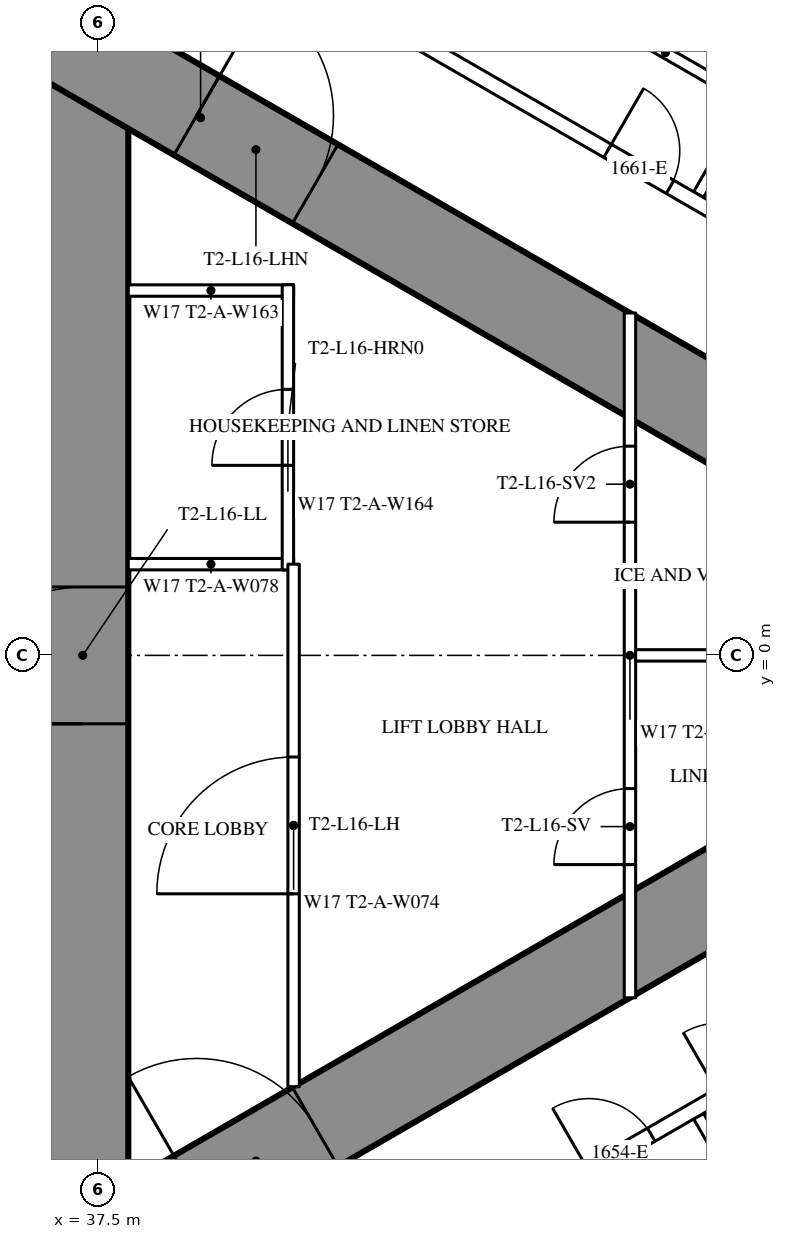
"""IFC4 building model, lengths in metres.
Left out: names, types, materials, properties, quantities, classifications, styles, units other than length and angle.
Written with IfcOpenShell. Run it as: python <this file> out.ifc"""

import sys

from ifc_helpers import new_model, si_unit, direction, frame, frame_2d, origin, place, context, subcontext, project, spatial, rectangle, extrude, element, fill, save


model = new_model("IFC4")
c1 = context("Model", 3, precision=1e-05, world=origin(), true_north=direction((0.0, 1.0)))
c2 = subcontext(c1, "Body", "Model", "MODEL_VIEW")
j1 = project(units=[si_unit("LENGTHUNIT", "METRE"), si_unit("PLANEANGLEUNIT", "RADIAN")], contexts=[c1])
p1 = place(None, origin())
s1 = spatial("IfcSite", under=j1, at=p1, CompositionType="ELEMENT")
p2 = place(p1, origin())
s2 = spatial("IfcBuilding", under=s1, at=p2, CompositionType="ELEMENT")
p3 = place(p2, frame((0.0, 0.0, 63.5)))
s3 = spatial("IfcBuildingStorey", under=s2, at=p3, CompositionType="ELEMENT", Elevation=63.5)
p4 = place(p3, frame((37.3, -8.6, 0.0), z_axis=(0.0, 0.0, 1.0), x_axis=(0.0, 1.0, 0.0)))
e1 = element("IfcWall", 1, at=p4, inside=s3, PredefinedType="SHEAR", context=c2, shape_type="SweptSolid", body=[
    extrude(rectangle(XDim=17.2, YDim=1.2, at=frame_2d((8.6, 0.0))), origin(), (0.0, 0.0, 1.0), 3.5),
])
p5 = place(p4, frame((7.7, 0.0, 0.0)))
e2 = element("IfcOpeningElement", 2, at=p5, cuts=e1, PredefinedType="OPENING", context=c2, shape_type="SweptSolid", body=[
    extrude(rectangle(XDim=1.8, YDim=2.2, at=frame_2d((0.9, 1.1))), frame((0.0, 0.61, 0.0), z_axis=(0.0, -1.0, 0.0), x_axis=(1.0, 0.0, 0.0)), (0.0, 0.0, 1.0), 1.22),
])
p6 = place(p3, frame((27.2, -13.8, 0.0), z_axis=(0.0, 0.0, 1.0), x_axis=(0.866027159892, 0.499996958321, 0.0)))
e3 = element("IfcWall", 3, at=p6, inside=s3, PredefinedType="SHEAR", context=c2, shape_type="SweptSolid", body=[
    extrude(rectangle(XDim=27.947, YDim=1.2, at=frame_2d((13.973, 0.0))), origin(), (0.0, 0.0, 1.0), 3.5),
])
p7 = place(p6, frame((4.6, 0.0, 0.0)))
e4 = element("IfcOpeningElement", 4, at=p7, cuts=e3, PredefinedType="OPENING", context=c2, shape_type="SweptSolid", body=[
    extrude(rectangle(XDim=1.0, YDim=2.2, at=frame_2d((0.5, 1.1))), frame((0.0, 0.61, 0.0), z_axis=(0.0, -1.0, 0.0), x_axis=(1.0, 0.0, 0.0)), (0.0, 0.0, 1.0), 1.22),
])
p8 = place(p6, frame((13.395, 0.0, 0.0)))
e5 = element("IfcOpeningElement", 5, at=p8, cuts=e3, PredefinedType="OPENING", context=c2, shape_type="SweptSolid", body=[
    extrude(rectangle(XDim=1.8, YDim=2.2, at=frame_2d((0.9, 1.1))), frame((0.0, 0.61, 0.0), z_axis=(0.0, -1.0, 0.0), x_axis=(1.0, 0.0, 0.0)), (0.0, 0.0, 1.0), 1.22),
])
p9 = place(p3, frame((27.2, 13.8, 0.0), z_axis=(0.0, 0.0, 1.0), x_axis=(0.866024515034, -0.500001539357, 0.0)))
e6 = element("IfcWall", 6, at=p9, inside=s3, PredefinedType="SHEAR", context=c2, shape_type="SweptSolid", body=[
    extrude(rectangle(XDim=26.907, YDim=1.2, at=frame_2d((13.454, 0.0))), origin(), (0.0, 0.0, 1.0), 3.5),
])
p10 = place(p9, frame((4.6, 0.0, 0.0)))
e7 = element("IfcOpeningElement", 7, at=p10, cuts=e6, PredefinedType="OPENING", context=c2, shape_type="SweptSolid", body=[
    extrude(rectangle(XDim=1.0, YDim=2.2, at=frame_2d((0.5, 1.1))), frame((0.0, 0.61, 0.0), z_axis=(0.0, -1.0, 0.0), x_axis=(1.0, 0.0, 0.0)), (0.0, 0.0, 1.0), 1.22),
])
p11 = place(p9, frame((13.395, 0.0, 0.0)))
e8 = element("IfcOpeningElement", 8, at=p11, cuts=e6, PredefinedType="OPENING", context=c2, shape_type="SweptSolid", body=[
    extrude(rectangle(XDim=1.8, YDim=2.2, at=frame_2d((0.9, 1.1))), frame((0.0, 0.61, 0.0), z_axis=(0.0, -1.0, 0.0), x_axis=(1.0, 0.0, 0.0)), (0.0, 0.0, 1.0), 1.22),
])
p12 = place(p3, frame((45.403, -6.062, 0.0), z_axis=(0.0, 0.0, 1.0), x_axis=(0.500007077968, -0.866021317279, 0.0)))
e9 = element("IfcWall", 9, at=p12, inside=s3, PredefinedType="PARTITIONING", context=c2, shape_type="SweptSolid", body=[
    extrude(rectangle(XDim=12.721, YDim=0.15, at=frame_2d((6.361, 0.0))), origin(), (0.0, 0.0, 1.0), 3.25),
])
p13 = place(p3, frame((45.403, 6.062, 0.0), z_axis=(0.0, 0.0, 1.0), x_axis=(0.500013434677, 0.866017647131, 0.0)))
e10 = element("IfcWall", 10, at=p13, inside=s3, PredefinedType="PARTITIONING", context=c2, shape_type="SweptSolid", body=[
    extrude(rectangle(XDim=9.902, YDim=0.15, at=frame_2d((4.951, 0.0))), origin(), (0.0, 0.0, 1.0), 2.25),
])
p14 = place(p3, frame((37.96, -10.243, 0.0), z_axis=(0.0, 0.0, 1.0), x_axis=(0.866026429433, 0.499998223521, 0.0)))
e11 = element("IfcWall", 11, at=p14, inside=s3, PredefinedType="PARTITIONING", context=c2, shape_type="SweptSolid", body=[
    extrude(rectangle(XDim=20.487, YDim=0.2, at=frame_2d((10.243, 0.0))), origin(), (0.0, 0.0, 1.0), 3.25),
])
p15 = place(p14, frame((6.925, 0.0, 0.0)))
e12 = element("IfcOpeningElement", 12, at=p15, cuts=e11, PredefinedType="OPENING", context=c2, shape_type="SweptSolid", body=[
    extrude(rectangle(XDim=0.95, YDim=2.2, at=frame_2d((0.475, 1.1))), frame((0.0, 0.11, 0.0), z_axis=(0.0, -1.0, 0.0), x_axis=(1.0, 0.0, 0.0)), (0.0, 0.0, 1.0), 0.22),
])
p16 = place(p14, frame((8.912, 0.0, 0.0)))
e13 = element("IfcOpeningElement", 13, at=p16, cuts=e11, PredefinedType="OPENING", context=c2, shape_type="SweptSolid", body=[
    extrude(rectangle(XDim=0.95, YDim=2.2, at=frame_2d((0.475, 1.1))), frame((0.0, 0.11, 0.0), z_axis=(0.0, -1.0, 0.0), x_axis=(1.0, 0.0, 0.0)), (0.0, 0.0, 1.0), 0.22),
])
p17 = place(p14, frame((13.535, 0.0, 0.0)))
e14 = element("IfcOpeningElement", 14, at=p17, cuts=e11, PredefinedType="OPENING", context=c2, shape_type="SweptSolid", body=[
    extrude(rectangle(XDim=0.95, YDim=2.2, at=frame_2d((0.475, 1.1))), frame((0.0, 0.11, 0.0), z_axis=(0.0, -1.0, 0.0), x_axis=(1.0, 0.0, 0.0)), (0.0, 0.0, 1.0), 0.22),
])
p18 = place(p14, frame((17.585, 0.0, 0.0)))
e15 = element("IfcOpeningElement", 15, at=p18, cuts=e11, PredefinedType="OPENING", context=c2, shape_type="SweptSolid", body=[
    extrude(rectangle(XDim=0.95, YDim=2.2, at=frame_2d((0.475, 1.1))), frame((0.0, 0.11, 0.0), z_axis=(0.0, -1.0, 0.0), x_axis=(1.0, 0.0, 0.0)), (0.0, 0.0, 1.0), 0.22),
])
p19 = place(p14, frame((2.875, 0.0, 0.0)))
e16 = element("IfcOpeningElement", 16, at=p19, cuts=e11, PredefinedType="OPENING", context=c2, shape_type="SweptSolid", body=[
    extrude(rectangle(XDim=0.95, YDim=2.2, at=frame_2d((0.475, 1.1))), frame((0.0, 0.11, 0.0), z_axis=(0.0, -1.0, 0.0), x_axis=(1.0, 0.0, 0.0)), (0.0, 0.0, 1.0), 0.22),
])
p20 = place(p3, frame((41.619, 8.131, 0.0), z_axis=(0.0, 0.0, 1.0), x_axis=(0.86603245327, -0.499987789734, 0.0)))
e17 = element("IfcWall", 17, at=p20, inside=s3, PredefinedType="PARTITIONING", context=c2, shape_type="SweptSolid", body=[
    extrude(rectangle(XDim=16.142, YDim=0.2, at=frame_2d((8.071, 0.0))), origin(), (0.0, 0.0, 1.0), 3.25),
])
p21 = place(p20, frame((13.36, 0.0, 0.0)))
e18 = element("IfcOpeningElement", 18, at=p21, cuts=e17, PredefinedType="OPENING", context=c2, shape_type="SweptSolid", body=[
    extrude(rectangle(XDim=0.95, YDim=2.2, at=frame_2d((0.475, 1.1))), frame((0.0, 0.11, 0.0), z_axis=(0.0, -1.0, 0.0), x_axis=(1.0, 0.0, 0.0)), (0.0, 0.0, 1.0), 0.22),
])
p22 = place(p20, frame((4.687, 0.0, 0.0)))
e19 = element("IfcOpeningElement", 19, at=p22, cuts=e17, PredefinedType="OPENING", context=c2, shape_type="SweptSolid", body=[
    extrude(rectangle(XDim=0.95, YDim=2.2, at=frame_2d((0.475, 1.1))), frame((0.0, 0.11, 0.0), z_axis=(0.0, -1.0, 0.0), x_axis=(1.0, 0.0, 0.0)), (0.0, 0.0, 1.0), 0.22),
])
p23 = place(p20, frame((2.987, 0.0, 0.0)))
e20 = element("IfcOpeningElement", 20, at=p23, cuts=e17, PredefinedType="OPENING", context=c2, shape_type="SweptSolid", body=[
    extrude(rectangle(XDim=0.95, YDim=2.2, at=frame_2d((0.475, 1.1))), frame((0.0, 0.11, 0.0), z_axis=(0.0, -1.0, 0.0), x_axis=(1.0, 0.0, 0.0)), (0.0, 0.0, 1.0), 0.22),
])
p24 = place(p3, frame((43.895, 8.549, 0.0), z_axis=(0.0, 0.0, 1.0), x_axis=(0.866031185235, -0.4999899861, 0.0)))
e21 = element("IfcWall", 21, at=p24, inside=s3, PredefinedType="PARTITIONING", context=c2, shape_type="SweptSolid", body=[
    extrude(rectangle(XDim=2.475, YDim=0.15, at=frame_2d((1.238, 0.0))), origin(), (0.0, 0.0, 1.0), 3.25),
])
for number, where, z_axis, x_axis in (
    (22, (37.9, 1.2, 0.0), (0.0, 0.0, 1.0), (1.0, 0.0, 0.0)),
    (23, (37.9, 4.8, 0.0), (0.0, 0.0, 1.0), (1.0, 0.0, 0.0)),
):
    element("IfcWall", number, at=place(p3, frame(where, z_axis=z_axis, x_axis=x_axis)), inside=s3, PredefinedType="PARTITIONING", context=c2, shape_type="SweptSolid", body=[
        extrude(rectangle(XDim=2.175, YDim=0.15, at=frame_2d((1.087, 0.0))), origin(), (0.0, 0.0, 1.0), 3.25),
    ])
p25 = place(p3, frame((40.0, 1.125, 0.0), z_axis=(0.0, 0.0, 1.0), x_axis=(0.0, 1.0, 0.0)))
e24 = element("IfcWall", 24, at=p25, inside=s3, PredefinedType="PARTITIONING", context=c2, shape_type="SweptSolid", body=[
    extrude(rectangle(XDim=3.75, YDim=0.15, at=frame_2d((1.875, 0.0))), origin(), (0.0, 0.0, 1.0), 3.25),
])
p26 = place(p25, frame((1.375, 0.0, 0.0)))
e25 = element("IfcOpeningElement", 25, at=p26, cuts=e24, PredefinedType="OPENING", context=c2, shape_type="SweptSolid", body=[
    extrude(rectangle(XDim=1.0, YDim=2.2, at=frame_2d((0.5, 1.1))), frame((0.0, 0.085, 0.0), z_axis=(0.0, -1.0, 0.0), x_axis=(1.0, 0.0, 0.0)), (0.0, 0.0, 1.0), 0.17),
])
p27 = place(p3, frame((40.075, -5.674, 0.0), z_axis=(0.0, 0.0, 1.0), x_axis=(0.0, 1.0, 0.0)))
e26 = element("IfcWall", 26, at=p27, inside=s3, PredefinedType="PARTITIONING", context=c2, shape_type="SweptSolid", body=[
    extrude(rectangle(XDim=6.874, YDim=0.15, at=frame_2d((3.437, 0.0))), origin(), (0.0, 0.0, 1.0), 3.25),
])
p28 = place(p27, frame((2.537, 0.0, 0.0)))
e27 = element("IfcOpeningElement", 27, at=p28, cuts=e26, PredefinedType="OPENING", context=c2, shape_type="SweptSolid", body=[
    extrude(rectangle(XDim=1.8, YDim=2.2, at=frame_2d((0.9, 1.1))), frame((0.0, 0.085, 0.0), z_axis=(0.0, -1.0, 0.0), x_axis=(1.0, 0.0, 0.0)), (0.0, 0.0, 1.0), 0.17),
])
p29 = place(p3, frame((44.5, -4.505, 0.0), z_axis=(0.0, 0.0, 1.0), x_axis=(0.0, 1.0, 0.0)))
e28 = element("IfcWall", 28, at=p29, inside=s3, PredefinedType="PARTITIONING", context=c2, shape_type="SweptSolid", body=[
    extrude(rectangle(XDim=9.009, YDim=0.15, at=frame_2d((4.505, 0.0))), origin(), (0.0, 0.0, 1.0), 2.45),
])
p30 = place(p29, frame((1.752, 0.0, 0.0)))
e29 = element("IfcOpeningElement", 29, at=p30, cuts=e28, PredefinedType="OPENING", context=c2, shape_type="SweptSolid", body=[
    extrude(rectangle(XDim=1.0, YDim=2.2, at=frame_2d((0.5, 1.1))), frame((0.0, 0.085, 0.0), z_axis=(0.0, -1.0, 0.0), x_axis=(1.0, 0.0, 0.0)), (0.0, 0.0, 1.0), 0.17),
])
p31 = place(p29, frame((6.257, 0.0, 0.0)))
e30 = element("IfcOpeningElement", 30, at=p31, cuts=e28, PredefinedType="OPENING", context=c2, shape_type="SweptSolid", body=[
    extrude(rectangle(XDim=1.0, YDim=2.2, at=frame_2d((0.5, 1.1))), frame((0.0, 0.085, 0.0), z_axis=(0.0, -1.0, 0.0), x_axis=(1.0, 0.0, 0.0)), (0.0, 0.0, 1.0), 0.17),
])
p32 = place(p3, frame((44.575, 0.0, 0.0), z_axis=(0.0, 0.0, 1.0), x_axis=(1.0, 0.0, 0.0)))
e31 = element("IfcWall", 31, at=p32, inside=s3, PredefinedType="PARTITIONING", context=c2, shape_type="SweptSolid", body=[
    extrude(rectangle(XDim=7.727, YDim=0.15, at=frame_2d((3.864, 0.0))), origin(), (0.0, 0.0, 1.0), 2.25),
])
p33 = place(p15, origin())
e32 = element("IfcDoor", 32, at=p33, inside=s3, OperationType="SINGLE_SWING_LEFT", PredefinedType="DOOR", context=c2, shape_type="SweptSolid", body=[
    extrude(rectangle(XDim=0.95, YDim=2.2, at=frame_2d((0.475, 1.1))), frame((0.0, 0.025, 0.0), z_axis=(0.0, -1.0, 0.0), x_axis=(1.0, 0.0, 0.0)), (0.0, 0.0, 1.0), 0.05),
])
fill(e12, e32)
p34 = place(p23, origin())
e33 = element("IfcDoor", 33, at=p34, inside=s3, OperationType="SINGLE_SWING_LEFT", PredefinedType="DOOR", context=c2, shape_type="SweptSolid", body=[
    extrude(rectangle(XDim=0.95, YDim=2.2, at=frame_2d((0.475, 1.1))), frame((0.0, 0.025, 0.0), z_axis=(0.0, -1.0, 0.0), x_axis=(1.0, 0.0, 0.0)), (0.0, 0.0, 1.0), 0.05),
])
fill(e20, e33)
p35 = place(p26, origin())
e34 = element("IfcDoor", 34, at=p35, inside=s3, OperationType="SINGLE_SWING_LEFT", PredefinedType="DOOR", context=c2, shape_type="SweptSolid", body=[
    extrude(rectangle(XDim=1.0, YDim=2.2, at=frame_2d((0.5, 1.1))), frame((0.0, 0.025, 0.0), z_axis=(0.0, -1.0, 0.0), x_axis=(1.0, 0.0, 0.0)), (0.0, 0.0, 1.0), 0.05),
])
fill(e25, e34)
p36 = place(p28, origin())
e35 = element("IfcDoor", 35, at=p36, inside=s3, OperationType="DOUBLE_DOOR_SINGLE_SWING", PredefinedType="DOOR", context=c2, shape_type="SweptSolid", body=[
    extrude(rectangle(XDim=1.8, YDim=2.2, at=frame_2d((0.9, 1.1))), frame((0.0, 0.025, 0.0), z_axis=(0.0, -1.0, 0.0), x_axis=(1.0, 0.0, 0.0)), (0.0, 0.0, 1.0), 0.05),
])
fill(e27, e35)
p37 = place(p30, origin())
e36 = element("IfcDoor", 36, at=p37, inside=s3, OperationType="SINGLE_SWING_LEFT", PredefinedType="DOOR", context=c2, shape_type="SweptSolid", body=[
    extrude(rectangle(XDim=1.0, YDim=2.2, at=frame_2d((0.5, 1.1))), frame((0.0, 0.025, 0.0), z_axis=(0.0, -1.0, 0.0), x_axis=(1.0, 0.0, 0.0)), (0.0, 0.0, 1.0), 0.05),
])
fill(e29, e36)
p38 = place(p31, origin())
e37 = element("IfcDoor", 37, at=p38, inside=s3, OperationType="SINGLE_SWING_LEFT", PredefinedType="DOOR", context=c2, shape_type="SweptSolid", body=[
    extrude(rectangle(XDim=1.0, YDim=2.2, at=frame_2d((0.5, 1.1))), frame((0.0, 0.025, 0.0), z_axis=(0.0, -1.0, 0.0), x_axis=(1.0, 0.0, 0.0)), (0.0, 0.0, 1.0), 0.05),
])
fill(e30, e37)
p39 = place(p8, origin())
e38 = element("IfcDoor", 38, at=p39, inside=s3, OperationType="DOUBLE_DOOR_SINGLE_SWING", PredefinedType="DOOR", context=c2, shape_type="SweptSolid", body=[
    extrude(rectangle(XDim=1.8, YDim=2.2, at=frame_2d((0.9, 1.1))), frame((0.0, 0.025, 0.0), z_axis=(0.0, -1.0, 0.0), x_axis=(1.0, 0.0, 0.0)), (0.0, 0.0, 1.0), 0.05),
])
fill(e5, e38)
p40 = place(p11, origin())
e39 = element("IfcDoor", 39, at=p40, inside=s3, OperationType="DOUBLE_DOOR_SINGLE_SWING", PredefinedType="DOOR", context=c2, shape_type="SweptSolid", body=[
    extrude(rectangle(XDim=1.8, YDim=2.2, at=frame_2d((0.9, 1.1))), frame((0.0, 0.025, 0.0), z_axis=(0.0, -1.0, 0.0), x_axis=(1.0, 0.0, 0.0)), (0.0, 0.0, 1.0), 0.05),
])
fill(e8, e39)
p41 = place(p5, origin())
e40 = element("IfcDoor", 40, at=p41, inside=s3, OperationType="DOUBLE_DOOR_SINGLE_SWING", PredefinedType="DOOR", context=c2, shape_type="SweptSolid", body=[
    extrude(rectangle(XDim=1.8, YDim=2.2, at=frame_2d((0.9, 1.1))), frame((0.0, 0.025, 0.0), z_axis=(0.0, -1.0, 0.0), x_axis=(1.0, 0.0, 0.0)), (0.0, 0.0, 1.0), 0.05),
])
fill(e2, e40)
save(model, sys.argv[1])
